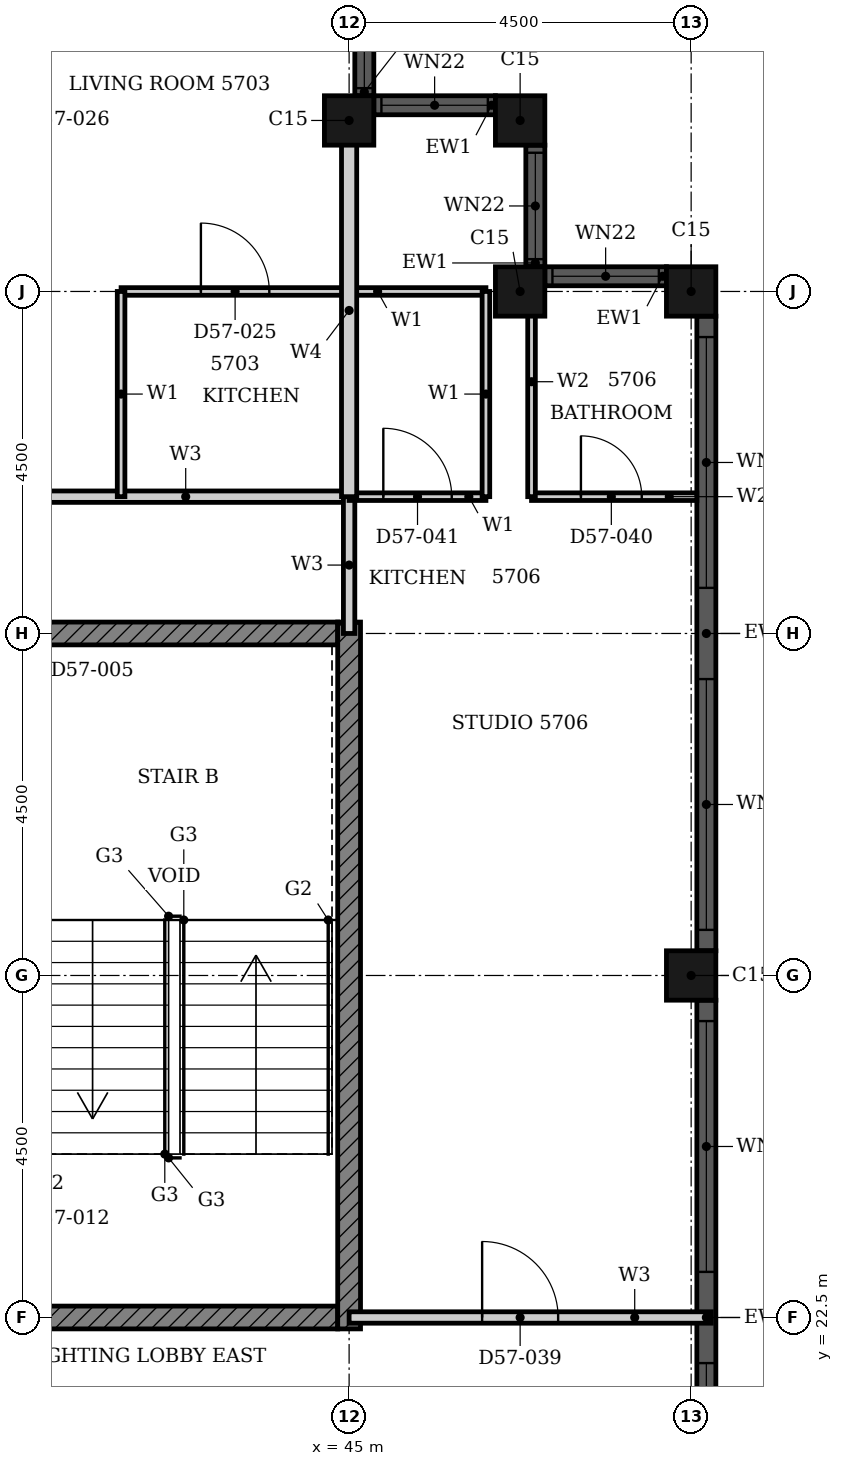
"""IFC4 building model, lengths in metres.
Left out: names, types, materials, properties, quantities, classifications, styles, units other than length and angle.
Written with IfcOpenShell. Run it as: python <this file> out.ifc"""

import sys

from ifc_helpers import new_model, si_unit, direction, frame, frame_2d, origin, origin_2d, place, context, subcontext, project, spatial, rectangle, hollow_rectangle, extrude, element, fill, save


model = new_model("IFC4")
c1 = context("Model", 3, precision=1e-05, world=origin(), true_north=direction((0.0, 1.0)))
c2 = subcontext(c1, "Body", "Model", "MODEL_VIEW")
j1 = project(units=[si_unit("LENGTHUNIT", "METRE"), si_unit("PLANEANGLEUNIT", "RADIAN")], contexts=[c1])
p1 = place(None, origin())
s1 = spatial("IfcSite", under=j1, at=p1, CompositionType="ELEMENT")
p2 = place(p1, origin())
s2 = spatial("IfcBuilding", under=s1, at=p2, CompositionType="ELEMENT")
p3 = place(p2, frame((0.0, 0.0, 225.7)))
s3 = spatial("IfcBuildingStorey", under=s2, at=p3, CompositionType="ELEMENT", Elevation=225.7)
for number, where, z_axis, x_axis in (
    (1, (49.5, 27.0, 0.0), (0.0, 0.0, 1.0), (1.0, 0.0, 0.0)),
    (2, (49.5, 36.0, 0.0), (0.0, 0.0, 1.0), (1.0, 0.0, 0.0)),
    (3, (47.25, 36.0, 0.0), (0.0, 0.0, 1.0), (1.0, 0.0, 0.0)),
    (4, (47.25, 38.25, 0.0), (0.0, 0.0, 1.0), (1.0, 0.0, 0.0)),
    (5, (45.0, 38.25, 0.0), (0.0, 0.0, 1.0), (1.0, 0.0, 0.0)),
):
    element("IfcColumn", number, at=place(p3, frame(where, z_axis=z_axis, x_axis=x_axis)), inside=s3, PredefinedType="COLUMN", context=c2, shape_type="SweptSolid", body=[
        extrude(hollow_rectangle(XDim=0.65, YDim=0.65, WallThickness=0.021, at=origin_2d()), origin(), (0.0, 0.0, 1.0), 3.7),
    ])
p4 = place(p3, frame((49.7, 18.325, 0.0), z_axis=(0.0, 0.0, 1.0), x_axis=(0.0, 1.0, 0.0)))
e6 = element("IfcWall", 6, at=p4, inside=s3, PredefinedType="SOLIDWALL", context=c2, shape_type="SweptSolid", body=[
    extrude(rectangle(XDim=8.35, YDim=0.25, at=frame_2d((4.175, 0.0))), origin(), (0.0, 0.0, 1.0), 3.7),
])
p5 = place(p4, frame((0.275, 0.0, 0.45)))
e7 = element("IfcOpeningElement", 7, at=p5, cuts=e6, PredefinedType="OPENING", context=c2, shape_type="SweptSolid", body=[
    extrude(rectangle(XDim=3.3, YDim=2.3, at=frame_2d((1.65, 1.15))), frame((0.0, 0.135, 0.0), z_axis=(0.0, -1.0, 0.0), x_axis=(1.0, 0.0, 0.0)), (0.0, 0.0, 1.0), 0.27),
])
p6 = place(p4, frame((4.775, 0.0, 0.45)))
e8 = element("IfcOpeningElement", 8, at=p6, cuts=e6, PredefinedType="OPENING", context=c2, shape_type="SweptSolid", body=[
    extrude(rectangle(XDim=3.3, YDim=2.3, at=frame_2d((1.65, 1.15))), frame((0.0, 0.135, 0.0), z_axis=(0.0, -1.0, 0.0), x_axis=(1.0, 0.0, 0.0)), (0.0, 0.0, 1.0), 0.27),
])
p7 = place(p3, frame((49.7, 27.325, 0.0), z_axis=(0.0, 0.0, 1.0), x_axis=(0.0, 1.0, 0.0)))
e9 = element("IfcWall", 9, at=p7, inside=s3, PredefinedType="SOLIDWALL", context=c2, shape_type="SweptSolid", body=[
    extrude(rectangle(XDim=8.35, YDim=0.25, at=frame_2d((4.175, 0.0))), origin(), (0.0, 0.0, 1.0), 3.7),
])
p8 = place(p7, frame((0.275, 0.0, 0.45)))
e10 = element("IfcOpeningElement", 10, at=p8, cuts=e9, PredefinedType="OPENING", context=c2, shape_type="SweptSolid", body=[
    extrude(rectangle(XDim=3.3, YDim=2.3, at=frame_2d((1.65, 1.15))), frame((0.0, 0.135, 0.0), z_axis=(0.0, -1.0, 0.0), x_axis=(1.0, 0.0, 0.0)), (0.0, 0.0, 1.0), 0.27),
])
p9 = place(p7, frame((4.775, 0.0, 0.45)))
e11 = element("IfcOpeningElement", 11, at=p9, cuts=e9, PredefinedType="OPENING", context=c2, shape_type="SweptSolid", body=[
    extrude(rectangle(XDim=3.3, YDim=2.3, at=frame_2d((1.65, 1.15))), frame((0.0, 0.135, 0.0), z_axis=(0.0, -1.0, 0.0), x_axis=(1.0, 0.0, 0.0)), (0.0, 0.0, 1.0), 0.27),
])
p10 = place(p3, frame((49.175, 36.2, 0.0), z_axis=(0.0, 0.0, 1.0), x_axis=(-1.0, 0.0, 0.0)))
e12 = element("IfcWall", 12, at=p10, inside=s3, PredefinedType="SOLIDWALL", context=c2, shape_type="SweptSolid", body=[
    extrude(rectangle(XDim=1.6, YDim=0.25, at=frame_2d((0.8, 0.0))), origin(), (0.0, 0.0, 1.0), 3.7),
])
p11 = place(p10, frame((0.1, 0.0, 0.9)))
e13 = element("IfcOpeningElement", 13, at=p11, cuts=e12, PredefinedType="OPENING", context=c2, shape_type="SweptSolid", body=[
    extrude(rectangle(XDim=1.4, YDim=1.85, at=frame_2d((0.7, 0.925))), frame((0.0, 0.135, 0.0), z_axis=(0.0, -1.0, 0.0), x_axis=(1.0, 0.0, 0.0)), (0.0, 0.0, 1.0), 0.27),
])
p12 = place(p3, frame((47.45, 36.325, 0.0), z_axis=(0.0, 0.0, 1.0), x_axis=(0.0, 1.0, 0.0)))
e14 = element("IfcWall", 14, at=p12, inside=s3, PredefinedType="SOLIDWALL", context=c2, shape_type="SweptSolid", body=[
    extrude(rectangle(XDim=1.6, YDim=0.25, at=frame_2d((0.8, 0.0))), origin(), (0.0, 0.0, 1.0), 3.7),
])
p13 = place(p12, frame((0.1, 0.0, 0.9)))
e15 = element("IfcOpeningElement", 15, at=p13, cuts=e14, PredefinedType="OPENING", context=c2, shape_type="SweptSolid", body=[
    extrude(rectangle(XDim=1.4, YDim=1.85, at=frame_2d((0.7, 0.925))), frame((0.0, 0.135, 0.0), z_axis=(0.0, -1.0, 0.0), x_axis=(1.0, 0.0, 0.0)), (0.0, 0.0, 1.0), 0.27),
])
p14 = place(p3, frame((46.925, 38.45, 0.0), z_axis=(0.0, 0.0, 1.0), x_axis=(-1.0, 0.0, 0.0)))
e16 = element("IfcWall", 16, at=p14, inside=s3, PredefinedType="SOLIDWALL", context=c2, shape_type="SweptSolid", body=[
    extrude(rectangle(XDim=1.6, YDim=0.25, at=frame_2d((0.8, 0.0))), origin(), (0.0, 0.0, 1.0), 3.7),
])
p15 = place(p14, frame((0.1, 0.0, 0.9)))
e17 = element("IfcOpeningElement", 17, at=p15, cuts=e16, PredefinedType="OPENING", context=c2, shape_type="SweptSolid", body=[
    extrude(rectangle(XDim=1.4, YDim=1.85, at=frame_2d((0.7, 0.925))), frame((0.0, 0.135, 0.0), z_axis=(0.0, -1.0, 0.0), x_axis=(1.0, 0.0, 0.0)), (0.0, 0.0, 1.0), 0.27),
])
p16 = place(p3, frame((45.2, 38.575, 0.0), z_axis=(0.0, 0.0, 1.0), x_axis=(0.0, 1.0, 0.0)))
e18 = element("IfcWall", 18, at=p16, inside=s3, PredefinedType="SOLIDWALL", context=c2, shape_type="SweptSolid", body=[
    extrude(rectangle(XDim=1.6, YDim=0.25, at=frame_2d((0.8, 0.0))), origin(), (0.0, 0.0, 1.0), 3.7),
])
p17 = place(p16, frame((0.1, 0.0, 0.9)))
e19 = element("IfcOpeningElement", 19, at=p17, cuts=e18, PredefinedType="OPENING", context=c2, shape_type="SweptSolid", body=[
    extrude(rectangle(XDim=1.4, YDim=1.85, at=frame_2d((0.7, 0.925))), frame((0.0, 0.135, 0.0), z_axis=(0.0, -1.0, 0.0), x_axis=(1.0, 0.0, 0.0)), (0.0, 0.0, 1.0), 0.27),
])
p18 = place(p3, frame((32.911, 22.5, 0.0), z_axis=(0.0, 0.0, 1.0), x_axis=(1.0, 0.0, 0.0)))
e20 = element("IfcWall", 20, at=p18, inside=s3, PredefinedType="SHEAR", context=c2, shape_type="SweptSolid", body=[
    extrude(rectangle(XDim=11.939, YDim=0.3, at=frame_2d((5.97, 0.0))), origin(), (0.0, 0.0, 1.0), 3.4),
])
p19 = place(p18, frame((5.404, 0.0, 0.0)))
e21 = element("IfcOpeningElement", 21, at=p19, cuts=e20, PredefinedType="OPENING", context=c2, shape_type="SweptSolid", body=[
    extrude(rectangle(XDim=1.8, YDim=2.1, at=frame_2d((0.9, 1.05))), frame((0.0, 0.16, 0.0), z_axis=(0.0, -1.0, 0.0), x_axis=(1.0, 0.0, 0.0)), (0.0, 0.0, 1.0), 0.32),
])
p20 = place(p3, frame((40.625, 31.5, 0.0), z_axis=(0.0, 0.0, 1.0), x_axis=(1.0, 0.0, 0.0)))
e22 = element("IfcWall", 22, at=p20, inside=s3, PredefinedType="SHEAR", context=c2, shape_type="SweptSolid", body=[
    extrude(rectangle(XDim=4.225, YDim=0.3, at=frame_2d((2.113, 0.0))), origin(), (0.0, 0.0, 1.0), 3.4),
])
p21 = place(p3, frame((45.0, 22.35, 0.0), z_axis=(0.0, 0.0, 1.0), x_axis=(0.0, 1.0, 0.0)))
e23 = element("IfcWall", 23, at=p21, inside=s3, PredefinedType="SHEAR", context=c2, shape_type="SweptSolid", body=[
    extrude(rectangle(XDim=9.3, YDim=0.3, at=frame_2d((4.65, 0.0))), origin(), (0.0, 0.0, 1.0), 3.4),
])
p22 = place(p3, frame((45.0, 22.5, 0.0), z_axis=(0.0, 0.0, 1.0), x_axis=(1.0, 0.0, 0.0)))
e24 = element("IfcWall", 24, at=p22, inside=s3, PredefinedType="PARTITIONING", context=c2, shape_type="SweptSolid", body=[
    extrude(rectangle(XDim=4.765, YDim=0.15, at=frame_2d((2.382, 0.0))), origin(), (0.0, 0.0, 1.0), 3.4),
])
p23 = place(p22, frame((1.75, 0.0, 0.0)))
e25 = element("IfcOpeningElement", 25, at=p23, cuts=e24, PredefinedType="OPENING", context=c2, shape_type="SweptSolid", body=[
    extrude(rectangle(XDim=1.0, YDim=2.2, at=frame_2d((0.5, 1.1))), frame((0.0, 0.085, 0.0), z_axis=(0.0, -1.0, 0.0), x_axis=(1.0, 0.0, 0.0)), (0.0, 0.0, 1.0), 0.17),
])
p24 = place(p3, frame((38.4, 33.3, 0.0), z_axis=(0.0, 0.0, 1.0), x_axis=(1.0, 0.0, 0.0)))
e26 = element("IfcWall", 26, at=p24, inside=s3, PredefinedType="PARTITIONING", context=c2, shape_type="SweptSolid", body=[
    extrude(rectangle(XDim=6.6, YDim=0.15, at=frame_2d((3.3, 0.0))), origin(), (0.0, 0.0, 1.0), 3.4),
])
p25 = place(p24, frame((1.3, 0.0, 0.0)))
e27 = element("IfcOpeningElement", 27, at=p25, cuts=e26, PredefinedType="OPENING", context=c2, shape_type="SweptSolid", body=[
    extrude(rectangle(XDim=1.0, YDim=2.2, at=frame_2d((0.5, 1.1))), frame((0.0, 0.085, 0.0), z_axis=(0.0, -1.0, 0.0), x_axis=(1.0, 0.0, 0.0)), (0.0, 0.0, 1.0), 0.17),
])
p26 = place(p3, frame((45.0, 31.5, 0.0), z_axis=(0.0, 0.0, 1.0), x_axis=(0.0, 1.0, 0.0)))
e28 = element("IfcWall", 28, at=p26, inside=s3, PredefinedType="PARTITIONING", context=c2, shape_type="SweptSolid", body=[
    extrude(rectangle(XDim=1.8, YDim=0.15, at=frame_2d((0.9, 0.0))), origin(), (0.0, 0.0, 1.0), 3.4),
])
p27 = place(p3, frame((45.0, 33.3, 0.0), z_axis=(0.0, 0.0, 1.0), x_axis=(1.0, 0.0, 0.0)))
e29 = element("IfcWall", 29, at=p27, inside=s3, PredefinedType="PARTITIONING", context=c2, shape_type="SweptSolid", body=[
    extrude(rectangle(XDim=1.8, YDim=0.1, at=frame_2d((0.9, 0.0))), origin(), (0.0, 0.0, 1.0), 3.4),
])
p28 = place(p27, frame((0.45, 0.0, 0.0)))
e30 = element("IfcOpeningElement", 30, at=p28, cuts=e29, PredefinedType="OPENING", context=c2, shape_type="SweptSolid", body=[
    extrude(rectangle(XDim=0.9, YDim=2.1, at=frame_2d((0.45, 1.05))), frame((0.0, 0.06, 0.0), z_axis=(0.0, -1.0, 0.0), x_axis=(1.0, 0.0, 0.0)), (0.0, 0.0, 1.0), 0.12),
])
p29 = place(p3, frame((42.0, 36.0, 0.0), z_axis=(0.0, 0.0, 1.0), x_axis=(1.0, 0.0, 0.0)))
e31 = element("IfcWall", 31, at=p29, inside=s3, PredefinedType="PARTITIONING", context=c2, shape_type="SweptSolid", body=[
    extrude(rectangle(XDim=4.8, YDim=0.1, at=frame_2d((2.4, 0.0))), origin(), (0.0, 0.0, 1.0), 3.4),
])
p30 = place(p29, frame((1.05, 0.0, 0.0)))
e32 = element("IfcOpeningElement", 32, at=p30, cuts=e31, PredefinedType="OPENING", context=c2, shape_type="SweptSolid", body=[
    extrude(rectangle(XDim=0.9, YDim=2.1, at=frame_2d((0.45, 1.05))), frame((0.0, 0.06, 0.0), z_axis=(0.0, -1.0, 0.0), x_axis=(1.0, 0.0, 0.0)), (0.0, 0.0, 1.0), 0.12),
])
for number, where, z_axis, x_axis in (
    (33, (42.0, 33.3, 0.0), (0.0, 0.0, 1.0), (0.0, 1.0, 0.0)),
    (34, (46.8, 33.3, 0.0), (0.0, 0.0, 1.0), (0.0, 1.0, 0.0)),
):
    element("IfcWall", number, at=place(p3, frame(where, z_axis=z_axis, x_axis=x_axis)), inside=s3, PredefinedType="PARTITIONING", context=c2, shape_type="SweptSolid", body=[
        extrude(rectangle(XDim=2.7, YDim=0.1, at=frame_2d((1.35, 0.0))), origin(), (0.0, 0.0, 1.0), 3.4),
    ])
p31 = place(p3, frame((45.0, 33.3, 0.0), z_axis=(0.0, 0.0, 1.0), x_axis=(0.0, 1.0, 0.0)))
e35 = element("IfcWall", 35, at=p31, inside=s3, PredefinedType="PARTITIONING", context=c2, shape_type="SweptSolid", body=[
    extrude(rectangle(XDim=4.9, YDim=0.2, at=frame_2d((2.45, 0.0))), origin(), (0.0, 0.0, 1.0), 3.4),
])
p32 = place(p3, frame((47.4, 33.3, 0.0), z_axis=(0.0, 0.0, 1.0), x_axis=(1.0, 0.0, 0.0)))
e36 = element("IfcWall", 36, at=p32, inside=s3, PredefinedType="PARTITIONING", context=c2, shape_type="SweptSolid", body=[
    extrude(rectangle(XDim=2.175, YDim=0.1, at=frame_2d((1.087, 0.0))), origin(), (0.0, 0.0, 1.0), 3.4),
])
p33 = place(p32, frame((0.65, 0.0, 0.0)))
e37 = element("IfcOpeningElement", 37, at=p33, cuts=e36, PredefinedType="OPENING", context=c2, shape_type="SweptSolid", body=[
    extrude(rectangle(XDim=0.8, YDim=2.1, at=frame_2d((0.4, 1.05))), frame((0.0, 0.06, 0.0), z_axis=(0.0, -1.0, 0.0), x_axis=(1.0, 0.0, 0.0)), (0.0, 0.0, 1.0), 0.12),
])
p34 = place(p3, frame((47.4, 33.3, 0.0), z_axis=(0.0, 0.0, 1.0), x_axis=(0.0, 1.0, 0.0)))
e38 = element("IfcWall", 38, at=p34, inside=s3, PredefinedType="PARTITIONING", context=c2, shape_type="SweptSolid", body=[
    extrude(rectangle(XDim=3.025, YDim=0.1, at=frame_2d((1.512, 0.0))), origin(), (0.0, 0.0, 1.0), 3.4),
])
p35 = place(p5, origin())
e39 = element("IfcWindow", 39, at=p35, inside=s3, PartitioningType="SINGLE_PANEL", PredefinedType="WINDOW", context=c2, shape_type="SweptSolid", body=[
    extrude(rectangle(XDim=3.3, YDim=2.3, at=frame_2d((1.65, 1.15))), frame((0.0, 0.03, 0.0), z_axis=(0.0, -1.0, 0.0), x_axis=(1.0, 0.0, 0.0)), (0.0, 0.0, 1.0), 0.06),
])
fill(e7, e39)
p36 = place(p6, origin())
e40 = element("IfcWindow", 40, at=p36, inside=s3, PartitioningType="SINGLE_PANEL", PredefinedType="WINDOW", context=c2, shape_type="SweptSolid", body=[
    extrude(rectangle(XDim=3.3, YDim=2.3, at=frame_2d((1.65, 1.15))), frame((0.0, 0.03, 0.0), z_axis=(0.0, -1.0, 0.0), x_axis=(1.0, 0.0, 0.0)), (0.0, 0.0, 1.0), 0.06),
])
fill(e8, e40)
p37 = place(p8, origin())
e41 = element("IfcWindow", 41, at=p37, inside=s3, PartitioningType="SINGLE_PANEL", PredefinedType="WINDOW", context=c2, shape_type="SweptSolid", body=[
    extrude(rectangle(XDim=3.3, YDim=2.3, at=frame_2d((1.65, 1.15))), frame((0.0, 0.03, 0.0), z_axis=(0.0, -1.0, 0.0), x_axis=(1.0, 0.0, 0.0)), (0.0, 0.0, 1.0), 0.06),
])
fill(e10, e41)
p38 = place(p9, origin())
e42 = element("IfcWindow", 42, at=p38, inside=s3, PartitioningType="SINGLE_PANEL", PredefinedType="WINDOW", context=c2, shape_type="SweptSolid", body=[
    extrude(rectangle(XDim=3.3, YDim=2.3, at=frame_2d((1.65, 1.15))), frame((0.0, 0.03, 0.0), z_axis=(0.0, -1.0, 0.0), x_axis=(1.0, 0.0, 0.0)), (0.0, 0.0, 1.0), 0.06),
])
fill(e11, e42)
p39 = place(p11, origin())
e43 = element("IfcWindow", 43, at=p39, inside=s3, PartitioningType="SINGLE_PANEL", PredefinedType="WINDOW", context=c2, shape_type="SweptSolid", body=[
    extrude(rectangle(XDim=1.4, YDim=1.85, at=frame_2d((0.7, 0.925))), frame((0.0, 0.03, 0.0), z_axis=(0.0, -1.0, 0.0), x_axis=(1.0, 0.0, 0.0)), (0.0, 0.0, 1.0), 0.06),
])
fill(e13, e43)
p40 = place(p13, origin())
e44 = element("IfcWindow", 44, at=p40, inside=s3, PartitioningType="SINGLE_PANEL", PredefinedType="WINDOW", context=c2, shape_type="SweptSolid", body=[
    extrude(rectangle(XDim=1.4, YDim=1.85, at=frame_2d((0.7, 0.925))), frame((0.0, 0.03, 0.0), z_axis=(0.0, -1.0, 0.0), x_axis=(1.0, 0.0, 0.0)), (0.0, 0.0, 1.0), 0.06),
])
fill(e15, e44)
p41 = place(p15, origin())
e45 = element("IfcWindow", 45, at=p41, inside=s3, PartitioningType="SINGLE_PANEL", PredefinedType="WINDOW", context=c2, shape_type="SweptSolid", body=[
    extrude(rectangle(XDim=1.4, YDim=1.85, at=frame_2d((0.7, 0.925))), frame((0.0, 0.03, 0.0), z_axis=(0.0, -1.0, 0.0), x_axis=(1.0, 0.0, 0.0)), (0.0, 0.0, 1.0), 0.06),
])
fill(e17, e45)
p42 = place(p17, origin())
e46 = element("IfcWindow", 46, at=p42, inside=s3, PartitioningType="SINGLE_PANEL", PredefinedType="WINDOW", context=c2, shape_type="SweptSolid", body=[
    extrude(rectangle(XDim=1.4, YDim=1.85, at=frame_2d((0.7, 0.925))), frame((0.0, 0.03, 0.0), z_axis=(0.0, -1.0, 0.0), x_axis=(1.0, 0.0, 0.0)), (0.0, 0.0, 1.0), 0.06),
])
fill(e19, e46)
p43 = place(p30, origin())
e47 = element("IfcDoor", 47, at=p43, inside=s3, OperationType="SINGLE_SWING_RIGHT", PredefinedType="DOOR", context=c2, shape_type="SweptSolid", body=[
    extrude(rectangle(XDim=0.9, YDim=2.1, at=frame_2d((0.45, 1.05))), frame((0.0, 0.025, 0.0), z_axis=(0.0, -1.0, 0.0), x_axis=(1.0, 0.0, 0.0)), (0.0, 0.0, 1.0), 0.05),
])
fill(e32, e47)
p44 = place(p23, origin())
e48 = element("IfcDoor", 48, at=p44, inside=s3, OperationType="SINGLE_SWING_RIGHT", PredefinedType="DOOR", context=c2, shape_type="SweptSolid", body=[
    extrude(rectangle(XDim=1.0, YDim=2.2, at=frame_2d((0.5, 1.1))), frame((0.0, 0.025, 0.0), z_axis=(0.0, -1.0, 0.0), x_axis=(1.0, 0.0, 0.0)), (0.0, 0.0, 1.0), 0.05),
])
fill(e25, e48)
p45 = place(p33, origin())
e49 = element("IfcDoor", 49, at=p45, inside=s3, OperationType="SINGLE_SWING_RIGHT", PredefinedType="DOOR", context=c2, shape_type="SweptSolid", body=[
    extrude(rectangle(XDim=0.8, YDim=2.1, at=frame_2d((0.4, 1.05))), frame((0.0, 0.025, 0.0), z_axis=(0.0, -1.0, 0.0), x_axis=(1.0, 0.0, 0.0)), (0.0, 0.0, 1.0), 0.05),
])
fill(e37, e49)
p46 = place(p28, origin())
e50 = element("IfcDoor", 50, at=p46, inside=s3, OperationType="SINGLE_SWING_LEFT", PredefinedType="DOOR", context=c2, shape_type="SweptSolid", body=[
    extrude(rectangle(XDim=0.9, YDim=2.1, at=frame_2d((0.45, 1.05))), frame((0.0, 0.025, 0.0), z_axis=(0.0, -1.0, 0.0), x_axis=(1.0, 0.0, 0.0)), (0.0, 0.0, 1.0), 0.05),
])
fill(e30, e50)
save(model, sys.argv[1])
